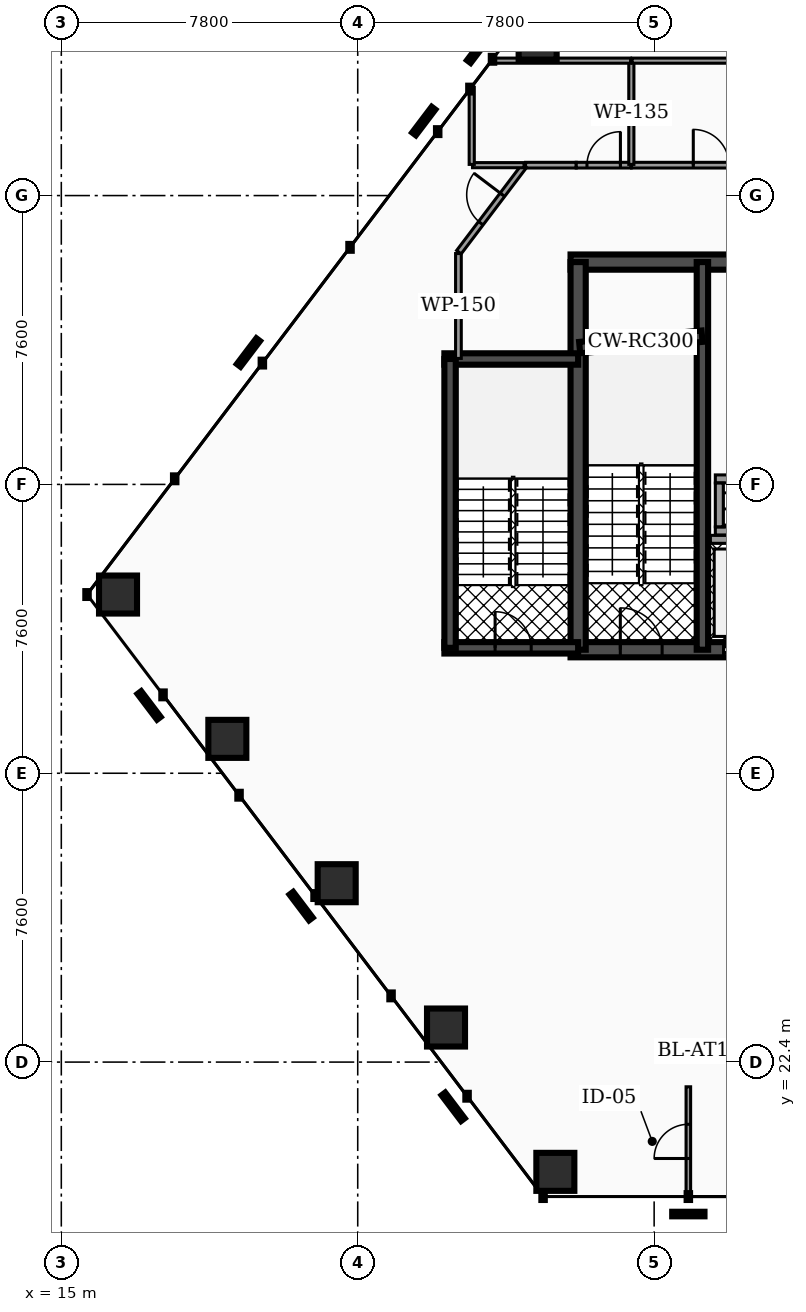
"""IFC4 building model, lengths in metres.
Left out: names, types, materials, properties, quantities, classifications, styles, units other than length and angle.
Written with IfcOpenShell. Run it as: python <this file> out.ifc"""

import sys

from ifc_helpers import new_model, si_unit, direction, frame, frame_2d, origin, origin_2d, place, context, subcontext, project, spatial, rectangle, hollow_rectangle, extrude, element, fill, save


model = new_model("IFC4")
c1 = context("Model", 3, precision=1e-05, world=origin(), true_north=direction((0.0, 1.0)))
c2 = subcontext(c1, "Body", "Model", "MODEL_VIEW")
j1 = project(units=[si_unit("LENGTHUNIT", "METRE"), si_unit("PLANEANGLEUNIT", "RADIAN")], contexts=[c1])
p1 = place(None, origin())
s1 = spatial("IfcSite", under=j1, at=p1, CompositionType="ELEMENT")
p2 = place(p1, origin())
s2 = spatial("IfcBuilding", under=s1, at=p2, CompositionType="ELEMENT")
p3 = place(p2, frame((0.0, 0.0, 60.18)))
s3 = spatial("IfcBuildingStorey", under=s2, at=p3, CompositionType="ELEMENT", Elevation=60.18)
p4 = place(p3, frame((28.4, 43.45, 0.0), z_axis=(0.0, 0.0, 1.0), x_axis=(1.0, 0.0, 0.0)))
e1 = element("IfcWall", 1, at=p4, inside=s3, PredefinedType="SHEAR", context=c2, shape_type="SweptSolid", body=[
    extrude(rectangle(XDim=20.06, YDim=0.4, at=frame_2d((10.03, 0.0))), origin(), (0.0, 0.0, 1.0), 3.82),
])
p5 = place(p3, frame((28.4, 33.25, 0.0), z_axis=(0.0, 0.0, 1.0), x_axis=(1.0, 0.0, 0.0)))
e2 = element("IfcWall", 2, at=p5, inside=s3, PredefinedType="SHEAR", context=c2, shape_type="SweptSolid", body=[
    extrude(rectangle(XDim=20.06, YDim=0.4, at=frame_2d((10.03, 0.0))), origin(), (0.0, 0.0, 1.0), 3.82),
])
p6 = place(p5, frame((4.03, 0.0, 0.0)))
e3 = element("IfcOpeningElement", 3, at=p6, cuts=e2, PredefinedType="OPENING", context=c2, shape_type="SweptSolid", body=[
    extrude(rectangle(XDim=1.1, YDim=2.15, at=frame_2d((0.55, 1.075))), frame((0.0, 0.21, 0.0), z_axis=(0.0, -1.0, 0.0), x_axis=(1.0, 0.0, 0.0)), (0.0, 0.0, 1.0), 0.42),
])
p7 = place(p5, frame((14.87, 0.0, 0.0)))
e4 = element("IfcOpeningElement", 4, at=p7, cuts=e2, PredefinedType="OPENING", context=c2, shape_type="SweptSolid", body=[
    extrude(rectangle(XDim=1.1, YDim=2.15, at=frame_2d((0.55, 1.075))), frame((0.0, 0.21, 0.0), z_axis=(0.0, -1.0, 0.0), x_axis=(1.0, 0.0, 0.0)), (0.0, 0.0, 1.0), 0.42),
])
p8 = place(p5, frame((1.31, 0.0, 0.0)))
e5 = element("IfcOpeningElement", 5, at=p8, cuts=e2, PredefinedType="OPENING", context=c2, shape_type="SweptSolid", body=[
    extrude(rectangle(XDim=1.1, YDim=2.2, at=frame_2d((0.55, 1.1))), frame((0.0, 0.21, 0.0), z_axis=(0.0, -1.0, 0.0), x_axis=(1.0, 0.0, 0.0)), (0.0, 0.0, 1.0), 0.42),
])
p9 = place(p5, frame((9.44, 0.0, 0.0)))
e6 = element("IfcOpeningElement", 6, at=p9, cuts=e2, PredefinedType="OPENING", context=c2, shape_type="SweptSolid", body=[
    extrude(rectangle(XDim=1.12, YDim=2.05, at=frame_2d((0.56, 1.025))), frame((0.0, 0.21, 0.0), z_axis=(0.0, -1.0, 0.0), x_axis=(1.0, 0.0, 0.0)), (0.0, 0.0, 1.0), 0.42),
])
p10 = place(p5, frame((17.65, 0.0, 0.0)))
e7 = element("IfcOpeningElement", 7, at=p10, cuts=e2, PredefinedType="OPENING", context=c2, shape_type="SweptSolid", body=[
    extrude(rectangle(XDim=1.1, YDim=2.2, at=frame_2d((0.55, 1.1))), frame((0.0, 0.21, 0.0), z_axis=(0.0, -1.0, 0.0), x_axis=(1.0, 0.0, 0.0)), (0.0, 0.0, 1.0), 0.42),
])
p11 = place(p3, frame((28.6, 33.25, 0.0), z_axis=(0.0, 0.0, 1.0), x_axis=(0.0, 1.0, 0.0)))
e8 = element("IfcWall", 8, at=p11, inside=s3, PredefinedType="SHEAR", context=c2, shape_type="SweptSolid", body=[
    extrude(rectangle(XDim=10.2, YDim=0.4, at=frame_2d((5.1, 0.0))), origin(), (0.0, 0.0, 1.0), 3.82),
])
p12 = place(p3, frame((31.87, 33.25, 0.0), z_axis=(0.0, 0.0, 1.0), x_axis=(0.0, 1.0, 0.0)))
e9 = element("IfcWall", 9, at=p12, inside=s3, PredefinedType="SHEAR", context=c2, shape_type="SweptSolid", body=[
    extrude(rectangle(XDim=10.2, YDim=0.3, at=frame_2d((5.1, 0.0))), origin(), (0.0, 0.0, 1.0), 3.82),
])
p13 = place(p3, frame((28.64, 41.2, 0.0), z_axis=(0.0, 0.0, 1.0), x_axis=(0.995687118776, 0.092774789157, 0.0)))
e10 = element("IfcWall", 10, at=p13, inside=s3, PredefinedType="SHEAR", context=c2, shape_type="SweptSolid", body=[
    extrude(rectangle(XDim=3.234, YDim=0.3, at=frame_2d((1.617, 0.0))), origin(), (0.0, 0.0, 1.0), 3.82),
])
p14 = place(p3, frame((25.08, 40.9, 0.0), z_axis=(0.0, 0.0, 1.0), x_axis=(1.0, 0.0, 0.0)))
e11 = element("IfcWall", 11, at=p14, inside=s3, PredefinedType="SHEAR", context=c2, shape_type="SweptSolid", body=[
    extrude(rectangle(XDim=3.52, YDim=0.3, at=frame_2d((1.76, 0.0))), origin(), (0.0, 0.0, 1.0), 3.82),
])
p15 = place(p3, frame((25.08, 33.3, 0.0), z_axis=(0.0, 0.0, 1.0), x_axis=(1.0, 0.0, 0.0)))
e12 = element("IfcWall", 12, at=p15, inside=s3, PredefinedType="SHEAR", context=c2, shape_type="SweptSolid", body=[
    extrude(rectangle(XDim=3.52, YDim=0.3, at=frame_2d((1.76, 0.0))), origin(), (0.0, 0.0, 1.0), 3.82),
])
p16 = place(p15, frame((1.335, 0.0, 0.0)))
e13 = element("IfcOpeningElement", 13, at=p16, cuts=e12, PredefinedType="OPENING", context=c2, shape_type="SweptSolid", body=[
    extrude(rectangle(XDim=0.95, YDim=2.2, at=frame_2d((0.475, 1.1))), frame((0.0, 0.16, 0.0), z_axis=(0.0, -1.0, 0.0), x_axis=(1.0, 0.0, 0.0)), (0.0, 0.0, 1.0), 0.32),
])
p17 = place(p3, frame((25.23, 33.3, 0.0), z_axis=(0.0, 0.0, 1.0), x_axis=(0.0, 1.0, 0.0)))
e14 = element("IfcWall", 14, at=p17, inside=s3, PredefinedType="SHEAR", context=c2, shape_type="SweptSolid", body=[
    extrude(rectangle(XDim=7.6, YDim=0.3, at=frame_2d((3.8, 0.0))), origin(), (0.0, 0.0, 1.0), 3.82),
])
p18 = place(p3, frame((33.294, 49.278, 0.0), z_axis=(-0.078014761976, -0.030441678551, 0.996487331139), x_axis=(0.363510291576, -0.931590182386, 0.0)))
e15 = element("IfcColumn", 15, at=p18, inside=s3, PredefinedType="COLUMN", context=c2, shape_type="SweptSolid", body=[
    extrude(hollow_rectangle(XDim=1.0, YDim=1.0, WallThickness=0.05, at=origin_2d()), origin(), (0.0, 0.0, 1.0), 3.833),
])
p19 = place(p3, frame((27.534, 49.278, 0.0), z_axis=(-0.148702169179, -0.030195257803, 0.988420918075), x_axis=(0.198997452583, -0.980000007074, 0.0)))
e16 = element("IfcColumn", 16, at=p19, inside=s3, PredefinedType="COLUMN", context=c2, shape_type="SweptSolid", body=[
    extrude(hollow_rectangle(XDim=1.0, YDim=1.0, WallThickness=0.05, at=origin_2d()), origin(), (0.0, 0.0, 1.0), 3.865),
])
p20 = place(p3, frame((16.492, 34.702, 0.0), z_axis=(-0.033343713935, 0.122725152429, 0.991880402923), x_axis=(-0.965016438766, -0.262189383673, 0.0)))
e17 = element("IfcColumn", 17, at=p20, inside=s3, PredefinedType="COLUMN", context=c2, shape_type="SweptSolid", body=[
    extrude(hollow_rectangle(XDim=1.0, YDim=1.0, WallThickness=0.05, at=origin_2d()), origin(), (0.0, 0.0, 1.0), 3.851),
])
p21 = place(p3, frame((19.369, 30.905, 0.0), z_axis=(-0.002420323733, 0.082354699635, 0.996600143227), x_axis=(-0.999568422366, -0.029376334145, 0.0)))
e18 = element("IfcColumn", 18, at=p21, inside=s3, PredefinedType="COLUMN", context=c2, shape_type="SweptSolid", body=[
    extrude(hollow_rectangle(XDim=1.0, YDim=1.0, WallThickness=0.05, at=origin_2d()), origin(), (0.0, 0.0, 1.0), 3.833),
])
p22 = place(p3, frame((22.246, 27.107, 0.0), z_axis=(0.028659091912, 0.041488663125, 0.998727864477), x_axis=(-0.82278415095, 0.568353975041, 0.0)))
e19 = element("IfcColumn", 19, at=p22, inside=s3, PredefinedType="COLUMN", context=c2, shape_type="SweptSolid", body=[
    extrude(hollow_rectangle(XDim=1.0, YDim=1.0, WallThickness=0.05, at=origin_2d()), origin(), (0.0, 0.0, 1.0), 3.825),
])
p23 = place(p3, frame((25.123, 23.309, 0.0), z_axis=(0.059713024499, 0.000446571764, 0.998215485393), x_axis=(-0.007478423348, 0.999972036201, 0.0)))
e20 = element("IfcColumn", 20, at=p23, inside=s3, PredefinedType="COLUMN", context=c2, shape_type="SweptSolid", body=[
    extrude(hollow_rectangle(XDim=1.0, YDim=1.0, WallThickness=0.05, at=origin_2d()), origin(), (0.0, 0.0, 1.0), 3.827),
])
p24 = place(p3, frame((28.0, 19.512, 0.0), z_axis=(0.090432989759, -0.040446822424, 0.995080865517), x_axis=(0.408281600663, 0.912856031672, 0.0)))
e21 = element("IfcColumn", 21, at=p24, inside=s3, PredefinedType="COLUMN", context=c2, shape_type="SweptSolid", body=[
    extrude(hollow_rectangle(XDim=1.0, YDim=1.0, WallThickness=0.05, at=origin_2d()), origin(), (0.0, 0.0, 1.0), 3.839),
])
p25 = place(p3, frame((32.08, 36.155, 0.0), z_axis=(0.0, 0.0, 1.0), x_axis=(1.0, 0.0, 0.0)))
e22 = element("IfcWall", 22, at=p25, inside=s3, PredefinedType="SOLIDWALL", context=c2, shape_type="SweptSolid", body=[
    extrude(rectangle(XDim=1.8, YDim=0.21, at=frame_2d((0.9, 0.0))), origin(), (0.0, 0.0, 1.0), 2.792),
])
for number, where, z_axis, x_axis in (
    (23, (32.21, 36.375, 0.0), (0.0, 0.0, 1.0), (1.0, 0.0, 0.0)),
    (24, (32.21, 37.745, 0.0), (0.0, 0.0, 1.0), (1.0, 0.0, 0.0)),
):
    element("IfcWall", number, at=place(p3, frame(where, z_axis=z_axis, x_axis=x_axis)), inside=s3, PredefinedType="SOLIDWALL", context=c2, shape_type="SweptSolid", body=[
        extrude(rectangle(XDim=1.6, YDim=0.21, at=frame_2d((0.8, 0.0))), origin(), (0.0, 0.0, 1.0), 3.82),
    ])
p26 = place(p3, frame((32.315, 36.485, 0.0), z_axis=(0.0, 0.0, 1.0), x_axis=(0.0, 1.0, 0.0)))
e25 = element("IfcWall", 25, at=p26, inside=s3, PredefinedType="SOLIDWALL", context=c2, shape_type="SweptSolid", body=[
    extrude(rectangle(XDim=1.15, YDim=0.21, at=frame_2d((0.575, 0.0))), origin(), (0.0, 0.0, 1.0), 3.82),
])
p27 = place(p3, frame((27.217, 46.0, 0.0), z_axis=(0.0, 0.0, 1.0), x_axis=(1.0, 0.0, 0.0)))
e26 = element("IfcWall", 26, at=p27, inside=s3, PredefinedType="PARTITIONING", context=c2, shape_type="SweptSolid", body=[
    extrude(rectangle(XDim=1.333, YDim=0.15, at=frame_2d((0.667, 0.0))), origin(), (0.0, 0.0, 1.0), 2.777),
])
p28 = place(p3, frame((28.55, 46.0, 0.0), z_axis=(0.0, 0.0, 1.0), x_axis=(1.0, 0.0, 0.0)))
e27 = element("IfcWall", 27, at=p28, inside=s3, PredefinedType="PARTITIONING", context=c2, shape_type="SweptSolid", body=[
    extrude(rectangle(XDim=1.445, YDim=0.15, at=frame_2d((0.723, 0.0))), origin(), (0.0, 0.0, 1.0), 2.777),
])
p29 = place(p28, frame((0.282, 0.0, 0.0)))
e28 = element("IfcOpeningElement", 28, at=p29, cuts=e27, PredefinedType="OPENING", context=c2, shape_type="SweptSolid", body=[
    extrude(rectangle(XDim=0.88, YDim=2.05, at=frame_2d((0.44, 1.025))), frame((0.0, 0.085, 0.0), z_axis=(0.0, -1.0, 0.0), x_axis=(1.0, 0.0, 0.0)), (0.0, 0.0, 1.0), 0.17),
])
p30 = place(p3, frame((30.005, 46.0, 0.0), z_axis=(0.0, 0.0, 1.0), x_axis=(1.0, 0.0, 0.0)))
e29 = element("IfcWall", 29, at=p30, inside=s3, PredefinedType="PARTITIONING", context=c2, shape_type="SweptSolid", body=[
    extrude(rectangle(XDim=4.19, YDim=0.15, at=frame_2d((2.095, 0.0))), origin(), (0.0, 0.0, 1.0), 2.777),
])
p31 = place(p30, frame((1.625, 0.0, 0.0)))
e30 = element("IfcOpeningElement", 30, at=p31, cuts=e29, PredefinedType="OPENING", context=c2, shape_type="SweptSolid", body=[
    extrude(rectangle(XDim=0.94, YDim=2.05, at=frame_2d((0.47, 1.025))), frame((0.0, 0.085, 0.0), z_axis=(0.0, -1.0, 0.0), x_axis=(1.0, 0.0, 0.0)), (0.0, 0.0, 1.0), 0.17),
])
p32 = place(p3, frame((25.45, 40.915, 0.0), z_axis=(0.0, 0.0, 1.0), x_axis=(0.0, 1.0, 0.0)))
e31 = element("IfcWall", 31, at=p32, inside=s3, PredefinedType="PARTITIONING", context=c2, shape_type="SweptSolid", body=[
    extrude(rectangle(XDim=2.759, YDim=0.15, at=frame_2d((1.38, 0.0))), origin(), (0.0, 0.0, 1.0), 2.777),
])
p33 = place(p3, frame((25.462, 43.71, 0.0), z_axis=(0.0, 0.0, 1.0), x_axis=(0.603800014115, 0.797135837204, 0.0)))
e32 = element("IfcWall", 32, at=p33, inside=s3, PredefinedType="PARTITIONING", context=c2, shape_type="SweptSolid", body=[
    extrude(rectangle(XDim=2.853, YDim=0.15, at=frame_2d((1.426, 0.0))), origin(), (0.0, 0.0, 1.0), 2.777),
])
p34 = place(p33, frame((0.956, 0.0, 0.0)))
e33 = element("IfcOpeningElement", 33, at=p34, cuts=e32, PredefinedType="OPENING", context=c2, shape_type="SweptSolid", body=[
    extrude(rectangle(XDim=0.94, YDim=2.05, at=frame_2d((0.47, 1.025))), frame((0.0, 0.085, 0.0), z_axis=(0.0, -1.0, 0.0), x_axis=(1.0, 0.0, 0.0)), (0.0, 0.0, 1.0), 0.17),
])
p35 = place(p3, frame((30.0, 46.02, 0.0), z_axis=(0.0, 0.0, 1.0), x_axis=(0.0, 1.0, 0.0)))
e34 = element("IfcWall", 34, at=p35, inside=s3, PredefinedType="PARTITIONING", context=c2, shape_type="SweptSolid", body=[
    extrude(rectangle(XDim=2.71, YDim=0.135, at=frame_2d((1.355, 0.0))), origin(), (0.0, 0.0, 1.0), 2.777),
])
p36 = place(p3, frame((25.82, 46.0, 0.0), z_axis=(0.0, 0.0, 1.0), x_axis=(1.0, 0.0, 0.0)))
e35 = element("IfcWall", 35, at=p36, inside=s3, PredefinedType="PARTITIONING", context=c2, shape_type="SweptSolid", body=[
    extrude(rectangle(XDim=1.356, YDim=0.135, at=frame_2d((0.678, 0.0))), origin(), (0.0, 0.0, 1.0), 2.777),
])
p37 = place(p3, frame((25.8, 46.02, 0.0), z_axis=(0.0, 0.0, 1.0), x_axis=(0.0, 1.0, 0.0)))
e36 = element("IfcWall", 36, at=p37, inside=s3, PredefinedType="PARTITIONING", context=c2, shape_type="SweptSolid", body=[
    extrude(rectangle(XDim=2.03, YDim=0.135, at=frame_2d((1.015, 0.0))), origin(), (0.0, 0.0, 1.0), 2.777),
])
p38 = place(p3, frame((26.334, 48.75, 0.0), z_axis=(0.0, 0.0, 1.0), x_axis=(1.0, 0.0, 0.0)))
e37 = element("IfcWall", 37, at=p38, inside=s3, PredefinedType="PARTITIONING", context=c2, shape_type="SweptSolid", body=[
    extrude(rectangle(XDim=3.646, YDim=0.135, at=frame_2d((1.823, 0.0))), origin(), (0.0, 0.0, 1.0), 2.777),
])
p39 = place(p3, frame((30.02, 48.75, 0.0), z_axis=(0.0, 0.0, 1.0), x_axis=(1.0, 0.0, 0.0)))
e38 = element("IfcWall", 38, at=p39, inside=s3, PredefinedType="PARTITIONING", context=c2, shape_type="SweptSolid", body=[
    extrude(rectangle(XDim=4.16, YDim=0.135, at=frame_2d((2.08, 0.0))), origin(), (0.0, 0.0, 1.0), 2.777),
])
p40 = place(p3, frame((31.5, 18.877, 0.0), z_axis=(0.0, 0.0, 1.0), x_axis=(0.0, 1.0, 0.0)))
e39 = element("IfcWall", 39, at=p40, inside=s3, PredefinedType="PARTITIONING", context=c2, shape_type="SweptSolid", body=[
    extrude(rectangle(XDim=2.873, YDim=0.12, at=frame_2d((1.437, 0.0))), origin(), (0.0, 0.0, 1.0), 2.777),
])
p41 = place(p40, frame((0.987, 0.0, 0.0)))
e40 = element("IfcOpeningElement", 40, at=p41, cuts=e39, PredefinedType="OPENING", context=c2, shape_type="SweptSolid", body=[
    extrude(rectangle(XDim=0.9, YDim=2.05, at=frame_2d((0.45, 1.025))), frame((0.0, 0.07, 0.0), z_axis=(0.0, -1.0, 0.0), x_axis=(1.0, 0.0, 0.0)), (0.0, 0.0, 1.0), 0.14),
])
p42 = place(p6, origin())
e41 = element("IfcDoor", 41, at=p42, inside=s3, OperationType="SLIDING_TO_LEFT", PredefinedType="DOOR", context=c2, shape_type="SweptSolid", body=[
    extrude(rectangle(XDim=1.1, YDim=2.15, at=frame_2d((0.55, 1.075))), frame((0.0, 0.025, 0.0), z_axis=(0.0, -1.0, 0.0), x_axis=(1.0, 0.0, 0.0)), (0.0, 0.0, 1.0), 0.05),
])
fill(e3, e41)
p43 = place(p8, origin())
e42 = element("IfcDoor", 42, at=p43, inside=s3, OperationType="SINGLE_SWING_LEFT", PredefinedType="DOOR", context=c2, shape_type="SweptSolid", body=[
    extrude(rectangle(XDim=1.1, YDim=2.2, at=frame_2d((0.55, 1.1))), frame((0.0, 0.025, 0.0), z_axis=(0.0, -1.0, 0.0), x_axis=(1.0, 0.0, 0.0)), (0.0, 0.0, 1.0), 0.05),
])
fill(e5, e42)
p44 = place(p16, origin())
e43 = element("IfcDoor", 43, at=p44, inside=s3, OperationType="SINGLE_SWING_LEFT", PredefinedType="DOOR", context=c2, shape_type="SweptSolid", body=[
    extrude(rectangle(XDim=0.95, YDim=2.2, at=frame_2d((0.475, 1.1))), frame((0.0, 0.025, 0.0), z_axis=(0.0, -1.0, 0.0), x_axis=(1.0, 0.0, 0.0)), (0.0, 0.0, 1.0), 0.05),
])
fill(e13, e43)
p45 = place(p29, origin())
e44 = element("IfcDoor", 44, at=p45, inside=s3, OperationType="SINGLE_SWING_RIGHT", PredefinedType="DOOR", context=c2, shape_type="SweptSolid", body=[
    extrude(rectangle(XDim=0.88, YDim=2.05, at=frame_2d((0.44, 1.025))), frame((0.0, 0.025, 0.0), z_axis=(0.0, -1.0, 0.0), x_axis=(1.0, 0.0, 0.0)), (0.0, 0.0, 1.0), 0.05),
])
fill(e28, e44)
p46 = place(p31, origin())
e45 = element("IfcDoor", 45, at=p46, inside=s3, OperationType="SINGLE_SWING_LEFT", PredefinedType="DOOR", context=c2, shape_type="SweptSolid", body=[
    extrude(rectangle(XDim=0.94, YDim=2.05, at=frame_2d((0.47, 1.025))), frame((0.0, 0.025, 0.0), z_axis=(0.0, -1.0, 0.0), x_axis=(1.0, 0.0, 0.0)), (0.0, 0.0, 1.0), 0.05),
])
fill(e30, e45)
p47 = place(p34, origin())
e46 = element("IfcDoor", 46, at=p47, inside=s3, OperationType="SINGLE_SWING_RIGHT", PredefinedType="DOOR", context=c2, shape_type="SweptSolid", body=[
    extrude(rectangle(XDim=0.94, YDim=2.05, at=frame_2d((0.47, 1.025))), frame((0.0, 0.025, 0.0), z_axis=(0.0, -1.0, 0.0), x_axis=(1.0, 0.0, 0.0)), (0.0, 0.0, 1.0), 0.05),
])
fill(e33, e46)
p48 = place(p41, origin())
e47 = element("IfcDoor", 47, at=p48, inside=s3, OperationType="SINGLE_SWING_LEFT", PredefinedType="DOOR", context=c2, shape_type="SweptSolid", body=[
    extrude(rectangle(XDim=0.9, YDim=2.05, at=frame_2d((0.45, 1.025))), frame((0.0, 0.025, 0.0), z_axis=(0.0, -1.0, 0.0), x_axis=(1.0, 0.0, 0.0)), (0.0, 0.0, 1.0), 0.05),
])
fill(e40, e47)
save(model, sys.argv[1])
